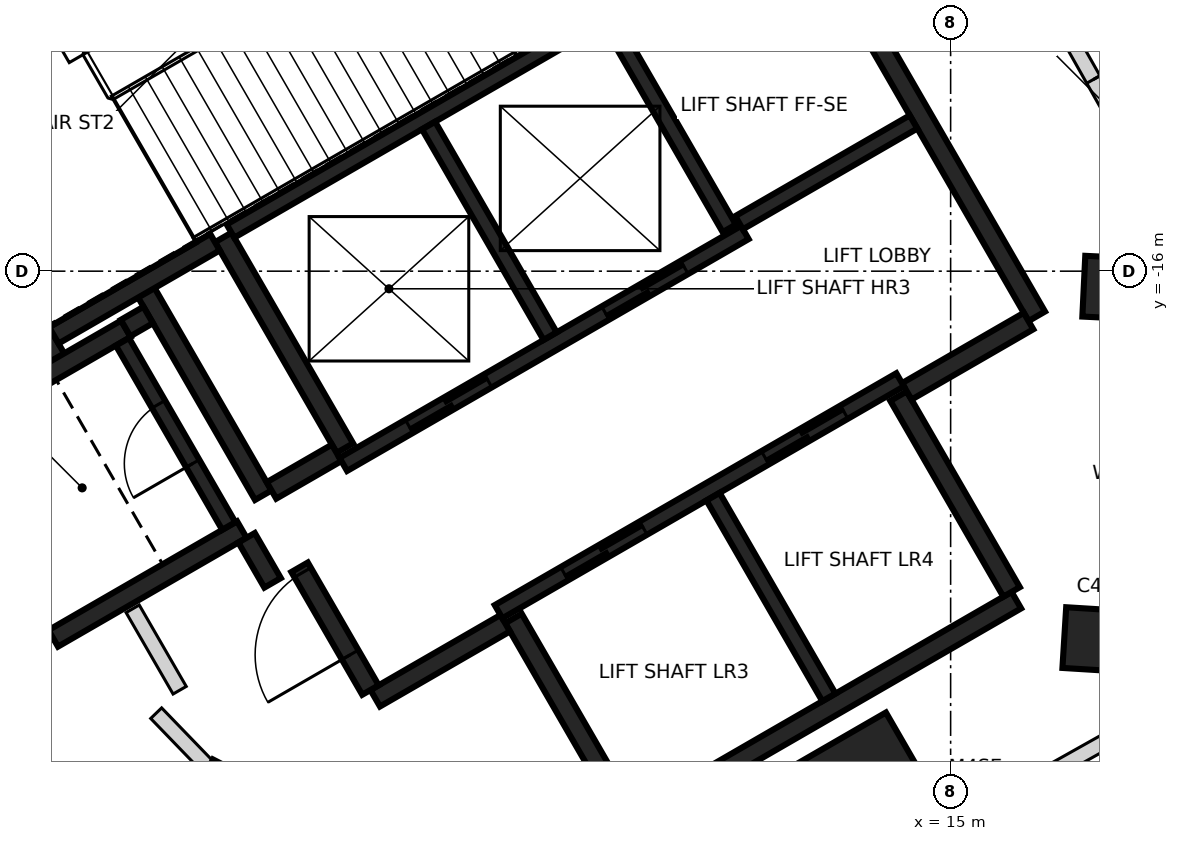
"""IFC4 building model, lengths in metres.
Left out: names, types, materials, properties, quantities, classifications, styles, units other than length and angle.
Written with IfcOpenShell. Run it as: python <this file> out.ifc"""

import sys

from ifc_helpers import new_model, si_unit, direction, frame, frame_2d, origin, origin_2d, place, context, subcontext, project, spatial, rectangle, extrude, element, fill, save


model = new_model("IFC4")
c1 = context("Model", 3, precision=1e-05, world=origin(), true_north=direction((0.0, 1.0)))
c2 = subcontext(c1, "Body", "Model", "MODEL_VIEW")
j1 = project(units=[si_unit("LENGTHUNIT", "METRE"), si_unit("PLANEANGLEUNIT", "RADIAN")], contexts=[c1])
p1 = place(None, origin())
s1 = spatial("IfcSite", under=j1, at=p1, CompositionType="ELEMENT")
p2 = place(p1, origin())
s2 = spatial("IfcBuilding", under=s1, at=p2, CompositionType="ELEMENT")
p3 = place(p2, frame((0.0, 0.0, 169.6)))
s3 = spatial("IfcBuildingStorey", under=s2, at=p3, CompositionType="ELEMENT", Elevation=169.6)
for number, where, z_axis, x_axis in (
    (1, (17.07, -20.856, -0.35), (0.0, 0.0, 1.0), (-0.998, 0.062, 0.0)),
    (2, (17.326, -16.226, -0.35), (0.0, 0.0, 1.0), (-0.999, 0.048, 0.0)),
    (3, (5.388, -23.118, -0.35), (0.0, 0.0, 1.0), (0.458, 0.889, 0.0)),
):
    element("IfcColumn", number, at=place(p3, frame(where, z_axis=z_axis, x_axis=x_axis)), inside=s3, PredefinedType="COLUMN", context=c2, shape_type="SweptSolid", body=[
        extrude(rectangle(XDim=1.15, YDim=0.8, at=origin_2d()), origin(), (0.0, 0.0, 1.0), 6.0),
    ])
p4 = place(p3, frame((13.78, -23.867, -0.35), z_axis=(0.0, 0.0, 1.0), x_axis=(-0.5, 0.866025403784, 0.0)))
e4 = element("IfcColumn", 4, at=p4, inside=s3, PredefinedType="COLUMN", context=c2, shape_type="SweptSolid", body=[
    extrude(rectangle(XDim=3.2, YDim=2.7, at=origin_2d()), origin(), (0.0, 0.0, 1.0), 6.0),
])
p5 = place(p3, frame((13.008, -11.181, 0.0), z_axis=(0.0, 0.0, 1.0), x_axis=(0.500004234368, -0.866022959057, 0.0)))
e5 = element("IfcWall", 5, at=p5, inside=s3, PredefinedType="SHEAR", context=c2, shape_type="SweptSolid", body=[
    extrude(rectangle(XDim=6.25, YDim=0.25, at=frame_2d((3.125, 0.0))), origin(), (0.0, 0.0, 1.0), 5.65),
])
p6 = place(p3, frame((15.865, -20.328, 0.0), z_axis=(0.0, 0.0, 1.0), x_axis=(-0.86602852612, -0.499994591916, 0.0)))
e6 = element("IfcWall", 6, at=p6, inside=s3, PredefinedType="SHEAR", context=c2, shape_type="SweptSolid", body=[
    extrude(rectangle(XDim=5.85, YDim=0.25, at=frame_2d((2.925, 0.0))), origin(), (0.0, 0.0, 1.0), 5.65),
])
p7 = place(p3, frame((3.235, -17.153, 0.0), z_axis=(0.0, 0.0, 1.0), x_axis=(-0.500008851346, 0.866020293397, 0.0)))
e7 = element("IfcWall", 7, at=p7, inside=s3, PredefinedType="SHEAR", context=c2, shape_type="SweptSolid", body=[
    extrude(rectangle(XDim=5.51, YDim=0.25, at=frame_2d((2.755, 0.0))), origin(), (0.0, 0.0, 1.0), 5.65),
])
p8 = place(p3, frame((7.031, -18.327, 0.0), z_axis=(0.0, 0.0, 1.0), x_axis=(-0.499971222258, 0.866042017984, 0.0)))
e8 = element("IfcWall", 8, at=p8, inside=s3, PredefinedType="SHEAR", context=c2, shape_type="SweptSolid", body=[
    extrude(rectangle(XDim=3.2, YDim=0.25, at=frame_2d((1.6, 0.0))), origin(), (0.0, 0.0, 1.0), 5.65),
])
for number, where, z_axis, x_axis in (
    (9, (14.315, -17.644, 0.0), (0.0, 0.0, 1.0), (0.5, -0.866, 0.0)),
    (10, (10.736, -23.145, 0.0), (0.0, 0.0, 1.0), (-0.5, 0.866, 0.0)),
):
    element("IfcWall", number, at=place(p3, frame(where, z_axis=z_axis, x_axis=x_axis)), inside=s3, PredefinedType="SHEAR", context=c2, shape_type="SweptSolid", body=[
        extrude(rectangle(XDim=2.974, YDim=0.25, at=frame_2d((1.487, 0.0))), origin(), (0.0, 0.0, 1.0), 5.65),
    ])
p9 = place(p3, frame((3.085, -20.894, 0.0), z_axis=(0.0, 0.0, 1.0), x_axis=(-0.499978833458, 0.866037623948, 0.0)))
e11 = element("IfcWall", 11, at=p9, inside=s3, PredefinedType="SHEAR", context=c2, shape_type="SweptSolid", body=[
    extrude(rectangle(XDim=3.05, YDim=0.25, at=frame_2d((1.525, 0.0))), origin(), (0.0, 0.0, 1.0), 5.65),
])
p10 = place(p3, frame((1.669, -18.19, 0.0), z_axis=(0.0, 0.0, 1.0), x_axis=(0.866042235819, 0.499970844928, 0.0)))
e12 = element("IfcWall", 12, at=p10, inside=s3, PredefinedType="SHEAR", context=c2, shape_type="SweptSolid", body=[
    extrude(rectangle(XDim=2.865, YDim=0.25, at=frame_2d((1.432, 0.0))), origin(), (0.0, 0.0, 1.0), 5.65),
])
p11 = place(p3, frame((5.675, -19.399, 0.0), z_axis=(0.0, 0.0, 1.0), x_axis=(-0.866026637627, -0.499997862916, 0.0)))
e13 = element("IfcWall", 13, at=p11, inside=s3, PredefinedType="SHEAR", context=c2, shape_type="SweptSolid", body=[
    extrude(rectangle(XDim=2.865, YDim=0.25, at=frame_2d((1.432, 0.0))), origin(), (0.0, 0.0, 1.0), 5.65),
])
p12 = place(p3, frame((4.414, -16.276, 0.0), z_axis=(0.0, 0.0, 1.0), x_axis=(0.500003324108, -0.866023484601, 0.0)))
e14 = element("IfcWall", 14, at=p12, inside=s3, PredefinedType="SHEAR", context=c2, shape_type="SweptSolid", body=[
    extrude(rectangle(XDim=3.085, YDim=0.25, at=frame_2d((1.542, 0.0))), origin(), (0.0, 0.0, 1.0), 5.65),
])
p13 = place(p3, frame((5.322, -15.619, 0.0), z_axis=(0.0, 0.0, 1.0), x_axis=(-0.866026229868, -0.499998569178, 0.0)))
e15 = element("IfcWall", 15, at=p13, inside=s3, PredefinedType="SHEAR", context=c2, shape_type="SweptSolid", body=[
    extrude(rectangle(XDim=2.449, YDim=0.25, at=frame_2d((1.225, 0.0))), origin(), (0.0, 0.0, 1.0), 5.65),
])
p14 = place(p3, frame((9.14, -20.631, 0.0), z_axis=(0.0, 0.0, 1.0), x_axis=(-0.866043531843, -0.499968599967, 0.0)))
e16 = element("IfcWall", 16, at=p14, inside=s3, PredefinedType="SHEAR", context=c2, shape_type="SweptSolid", body=[
    extrude(rectangle(XDim=1.975, YDim=0.25, at=frame_2d((0.987, 0.0))), origin(), (0.0, 0.0, 1.0), 5.65),
])
p15 = place(p3, frame((16.025, -16.656, 0.0), z_axis=(0.0, 0.0, 1.0), x_axis=(-0.866016279763, -0.500015802937, 0.0)))
e17 = element("IfcWall", 17, at=p15, inside=s3, PredefinedType="SHEAR", context=c2, shape_type="SweptSolid", body=[
    extrude(rectangle(XDim=1.849, YDim=0.25, at=frame_2d((0.925, 0.0))), origin(), (0.0, 0.0, 1.0), 5.65),
])
p16 = place(p3, frame((7.367, -21.51, 0.0), z_axis=(0.0, 0.0, 1.0), x_axis=(-0.499983108224, 0.866035156036, 0.0)))
e18 = element("IfcWall", 18, at=p16, inside=s3, PredefinedType="SHEAR", context=c2, shape_type="SweptSolid", body=[
    extrude(rectangle(XDim=1.865, YDim=0.25, at=frame_2d((0.932, 0.0))), origin(), (0.0, 0.0, 1.0), 5.65),
])
p17 = place(p16, frame((0.535, 0.0, 0.0)))
e19 = element("IfcOpeningElement", 19, at=p17, cuts=e18, PredefinedType="OPENING", context=c2, shape_type="SweptSolid", body=[
    extrude(rectangle(XDim=1.25, YDim=2.1, at=frame_2d((0.625, 1.05))), frame((0.0, 0.135, 0.0), z_axis=(0.0, -1.0, 0.0), x_axis=(1.0, 0.0, 0.0)), (0.0, 0.0, 1.0), 0.27),
])
p18 = place(p3, frame((6.065, -18.885, 0.0), z_axis=(0.0, 0.0, 1.0), x_axis=(0.866017078145, 0.500014420154, 0.0)))
e20 = element("IfcWall", 20, at=p18, inside=s3, PredefinedType="SHEAR", context=c2, shape_type="SweptSolid", body=[
    extrude(rectangle(XDim=0.989, YDim=0.25, at=frame_2d((0.495, 0.0))), origin(), (0.0, 0.0, 1.0), 5.65),
])
p19 = place(p3, frame((6.08, -20.1, 0.0), z_axis=(0.0, 0.0, 1.0), x_axis=(-0.500051773299, 0.865995510393, 0.0)))
e21 = element("IfcWall", 21, at=p19, inside=s3, PredefinedType="SHEAR", context=c2, shape_type="SweptSolid", body=[
    extrude(rectangle(XDim=0.685, YDim=0.25, at=frame_2d((0.342, 0.0))), origin(), (0.0, 0.0, 1.0), 5.65),
])
p20 = place(p3, frame((4.145, -16.749, 0.0), z_axis=(0.0, 0.0, 1.0), x_axis=(0.866185586049, 0.49972245349, 0.0)))
e22 = element("IfcWall", 22, at=p20, inside=s3, PredefinedType="SHEAR", context=c2, shape_type="SweptSolid", body=[
    extrude(rectangle(XDim=0.344, YDim=0.25, at=frame_2d((0.172, 0.0))), origin(), (0.0, 0.0, 1.0), 5.65),
])
p21 = place(p3, frame((9.052, -20.48, 0.0), z_axis=(0.0, 0.0, 1.0), x_axis=(0.866030299012, 0.499991521122, 0.0)))
e23 = element("IfcWall", 23, at=p21, inside=s3, PredefinedType="SHEAR", context=c2, shape_type="SweptSolid", body=[
    extrude(rectangle(XDim=6.1, YDim=0.2, at=frame_2d((3.05, 0.0))), origin(), (0.0, 0.0, 1.0), 5.65),
])
p22 = place(p21, frame((1.0, 0.0, 0.0)))
e24 = element("IfcOpeningElement", 24, at=p22, cuts=e23, PredefinedType="OPENING", context=c2, shape_type="SweptSolid", body=[
    extrude(rectangle(XDim=1.2, YDim=2.1, at=frame_2d((0.6, 1.05))), frame((0.0, 0.11, 0.0), z_axis=(0.0, -1.0, 0.0), x_axis=(1.0, 0.0, 0.0)), (0.0, 0.0, 1.0), 0.22),
])
p23 = place(p21, frame((4.05, 0.0, 0.0)))
e25 = element("IfcOpeningElement", 25, at=p23, cuts=e23, PredefinedType="OPENING", context=c2, shape_type="SweptSolid", body=[
    extrude(rectangle(XDim=1.2, YDim=2.1, at=frame_2d((0.6, 1.05))), frame((0.0, 0.11, 0.0), z_axis=(0.0, -1.0, 0.0), x_axis=(1.0, 0.0, 0.0)), (0.0, 0.0, 1.0), 0.22),
])
p24 = place(p3, frame((5.526, -15.472, 0.0), z_axis=(0.0, 0.0, 1.0), x_axis=(0.866041752167, 0.499971682701, 0.0)))
e26 = element("IfcWall", 26, at=p24, inside=s3, PredefinedType="SHEAR", context=c2, shape_type="SweptSolid", body=[
    extrude(rectangle(XDim=5.851, YDim=0.2, at=frame_2d((2.925, 0.0))), origin(), (0.0, 0.0, 1.0), 5.65),
])
p25 = place(p3, frame((12.293, -15.491, 0.0), z_axis=(0.0, 0.0, 1.0), x_axis=(-0.866030299012, -0.499991521122, 0.0)))
e27 = element("IfcWall", 27, at=p25, inside=s3, PredefinedType="SHEAR", context=c2, shape_type="SweptSolid", body=[
    extrude(rectangle(XDim=6.1, YDim=0.2, at=frame_2d((3.05, 0.0))), origin(), (0.0, 0.0, 1.0), 5.65),
])
p26 = place(p25, frame((3.9, 0.0, 0.0)))
e28 = element("IfcOpeningElement", 28, at=p26, cuts=e27, PredefinedType="OPENING", context=c2, shape_type="SweptSolid", body=[
    extrude(rectangle(XDim=1.2, YDim=2.1, at=frame_2d((0.6, 1.05))), frame((0.0, 0.11, 0.0), z_axis=(0.0, -1.0, 0.0), x_axis=(1.0, 0.0, 0.0)), (0.0, 0.0, 1.0), 0.22),
])
p27 = place(p25, frame((0.918, 0.0, 0.0)))
e29 = element("IfcOpeningElement", 29, at=p27, cuts=e27, PredefinedType="OPENING", context=c2, shape_type="SweptSolid", body=[
    extrude(rectangle(XDim=1.2, YDim=2.1, at=frame_2d((0.6, 1.05))), frame((0.0, 0.11, 0.0), z_axis=(0.0, -1.0, 0.0), x_axis=(1.0, 0.0, 0.0)), (0.0, 0.0, 1.0), 0.22),
])
p28 = place(p3, frame((8.132, -14.084, 0.0), z_axis=(0.0, 0.0, 1.0), x_axis=(0.499997778408, -0.866026686418, 0.0)))
e30 = element("IfcWall", 30, at=p28, inside=s3, PredefinedType="SHEAR", context=c2, shape_type="SweptSolid", body=[
    extrude(rectangle(XDim=3.198, YDim=0.2, at=frame_2d((1.599, 0.0))), origin(), (0.0, 0.0, 1.0), 5.65),
])
p29 = place(p3, frame((11.875, -18.967, 0.0), z_axis=(0.0, 0.0, 1.0), x_axis=(0.49998131003, -0.866036194175, 0.0)))
e31 = element("IfcWall", 31, at=p29, inside=s3, PredefinedType="SHEAR", context=c2, shape_type="SweptSolid", body=[
    extrude(rectangle(XDim=3.048, YDim=0.2, at=frame_2d((1.524, 0.0))), origin(), (0.0, 0.0, 1.0), 5.65),
])
p30 = place(p3, frame((5.503, -19.352, 0.0), z_axis=(0.0, 0.0, 1.0), x_axis=(-0.499986818241, 0.866033014143, 0.0)))
e32 = element("IfcWall", 32, at=p30, inside=s3, PredefinedType="SHEAR", context=c2, shape_type="SweptSolid", body=[
    extrude(rectangle(XDim=2.798, YDim=0.2, at=frame_2d((1.399, 0.0))), origin(), (0.0, 0.0, 1.0), 5.65),
])
p31 = place(p30, frame((0.949, 0.0, 0.0)))
e33 = element("IfcOpeningElement", 33, at=p31, cuts=e32, PredefinedType="OPENING", context=c2, shape_type="SweptSolid", body=[
    extrude(rectangle(XDim=0.9, YDim=2.1, at=frame_2d((0.45, 1.05))), frame((0.0, 0.11, 0.0), z_axis=(0.0, -1.0, 0.0), x_axis=(1.0, 0.0, 0.0)), (0.0, 0.0, 1.0), 0.22),
])
p32 = place(p3, frame((12.088, -15.437, 0.0), z_axis=(0.0, 0.0, 1.0), x_axis=(-0.500026960575, 0.86600983753, 0.0)))
e34 = element("IfcWall", 34, at=p32, inside=s3, PredefinedType="SHEAR", context=c2, shape_type="SweptSolid", body=[
    extrude(rectangle(XDim=3.1, YDim=0.2, at=frame_2d((1.55, 0.0))), origin(), (0.0, 0.0, 1.0), 5.65),
])
p33 = place(p3, frame((14.512, -14.037, 0.0), z_axis=(0.0, 0.0, 1.0), x_axis=(-0.866018407898, -0.500012117035, 0.0)))
e35 = element("IfcWall", 35, at=p33, inside=s3, PredefinedType="SHEAR", context=c2, shape_type="SweptSolid", body=[
    extrude(rectangle(XDim=2.651, YDim=0.2, at=frame_2d((1.325, 0.0))), origin(), (0.0, 0.0, 1.0), 5.65),
])
p34 = place(p3, frame((4.239, -20.442, 0.0), z_axis=(0.0, 0.0, 1.0), x_axis=(0.499790804427, -0.866146149221, 0.0)))
e36 = element("IfcWall", 36, at=p34, inside=s3, PredefinedType="PARTITIONING", context=c2, shape_type="SweptSolid", body=[
    extrude(rectangle(XDim=1.237, YDim=0.2, at=frame_2d((0.618, 0.0))), origin(), (0.0, 0.0, 1.0), 5.65),
])
p35 = place(p3, frame((4.548, -21.815, 0.0), z_axis=(0.0, 0.0, 1.0), x_axis=(0.694726619633, -0.71927388662, 0.0)))
e37 = element("IfcWall", 37, at=p35, inside=s3, PredefinedType="PARTITIONING", context=c2, shape_type="SweptSolid", body=[
    extrude(rectangle(XDim=1.88, YDim=0.2, at=frame_2d((0.94, 0.0))), origin(), (0.0, 0.0, 1.0), 5.65),
])
p36 = place(p3, frame((10.974, -25.59, 0.0), z_axis=(0.0, 0.0, 1.0), x_axis=(0.872017342382, 0.489474978508, 0.0)))
e38 = element("IfcWall", 38, at=p36, inside=s3, PredefinedType="PARTITIONING", context=c2, shape_type="SweptSolid", body=[
    extrude(rectangle(XDim=7.137, YDim=0.2, at=frame_2d((3.568, 0.0))), origin(), (0.0, 0.0, 1.0), 4.75),
])
p37 = place(p3, frame((12.187, -5.164, 0.0), z_axis=(0.0, 0.0, 1.0), x_axis=(0.491323462206, -0.870977184251, 0.0)))
e39 = element("IfcWall", 39, at=p37, inside=s3, PredefinedType="PARTITIONING", context=c2, shape_type="SweptSolid", body=[
    extrude(rectangle(XDim=12.523, YDim=0.2, at=frame_2d((6.261, 0.0))), origin(), (0.0, 0.0, 1.0), 4.75),
])
p38 = place(p37, frame((9.546, 0.0, 0.0)))
e40 = element("IfcOpeningElement", 40, at=p38, cuts=e39, PredefinedType="OPENING", context=c2, shape_type="SweptSolid", body=[
    extrude(rectangle(XDim=0.9, YDim=2.1, at=frame_2d((0.45, 1.05))), frame((0.0, 0.11, 0.0), z_axis=(0.0, -1.0, 0.0), x_axis=(1.0, 0.0, 0.0)), (0.0, 0.0, 1.0), 0.22),
])
p39 = place(p37, frame((2.168, 0.0, 0.0)))
e41 = element("IfcOpeningElement", 41, at=p39, cuts=e39, PredefinedType="OPENING", context=c2, shape_type="SweptSolid", body=[
    extrude(rectangle(XDim=1.0, YDim=2.1, at=frame_2d((0.5, 1.05))), frame((0.0, 0.11, 0.0), z_axis=(0.0, -1.0, 0.0), x_axis=(1.0, 0.0, 0.0)), (0.0, 0.0, 1.0), 0.22),
])
p40 = place(p26, origin())
e42 = element("IfcDoor", 42, at=p40, inside=s3, OperationType="DOUBLE_DOOR_SLIDING", PredefinedType="DOOR", context=c2, shape_type="SweptSolid", body=[
    extrude(rectangle(XDim=1.2, YDim=2.1, at=frame_2d((0.6, 1.05))), frame((0.0, 0.025, 0.0), z_axis=(0.0, -1.0, 0.0), x_axis=(1.0, 0.0, 0.0)), (0.0, 0.0, 1.0), 0.05),
])
fill(e28, e42)
p41 = place(p27, origin())
e43 = element("IfcDoor", 43, at=p41, inside=s3, OperationType="DOUBLE_DOOR_SLIDING", PredefinedType="DOOR", context=c2, shape_type="SweptSolid", body=[
    extrude(rectangle(XDim=1.2, YDim=2.1, at=frame_2d((0.6, 1.05))), frame((0.0, 0.025, 0.0), z_axis=(0.0, -1.0, 0.0), x_axis=(1.0, 0.0, 0.0)), (0.0, 0.0, 1.0), 0.05),
])
fill(e29, e43)
p42 = place(p22, origin())
e44 = element("IfcDoor", 44, at=p42, inside=s3, OperationType="DOUBLE_DOOR_SLIDING", PredefinedType="DOOR", context=c2, shape_type="SweptSolid", body=[
    extrude(rectangle(XDim=1.2, YDim=2.1, at=frame_2d((0.6, 1.05))), frame((0.0, 0.025, 0.0), z_axis=(0.0, -1.0, 0.0), x_axis=(1.0, 0.0, 0.0)), (0.0, 0.0, 1.0), 0.05),
])
fill(e24, e44)
p43 = place(p23, origin())
e45 = element("IfcDoor", 45, at=p43, inside=s3, OperationType="DOUBLE_DOOR_SLIDING", PredefinedType="DOOR", context=c2, shape_type="SweptSolid", body=[
    extrude(rectangle(XDim=1.2, YDim=2.1, at=frame_2d((0.6, 1.05))), frame((0.0, 0.025, 0.0), z_axis=(0.0, -1.0, 0.0), x_axis=(1.0, 0.0, 0.0)), (0.0, 0.0, 1.0), 0.05),
])
fill(e25, e45)
p44 = place(p17, origin())
e46 = element("IfcDoor", 46, at=p44, inside=s3, OperationType="SINGLE_SWING_LEFT", PredefinedType="DOOR", context=c2, shape_type="SweptSolid", body=[
    extrude(rectangle(XDim=1.25, YDim=2.1, at=frame_2d((0.625, 1.05))), frame((0.0, 0.025, 0.0), z_axis=(0.0, -1.0, 0.0), x_axis=(1.0, 0.0, 0.0)), (0.0, 0.0, 1.0), 0.05),
])
fill(e19, e46)
p45 = place(p31, origin())
e47 = element("IfcDoor", 47, at=p45, inside=s3, OperationType="SINGLE_SWING_LEFT", PredefinedType="DOOR", context=c2, shape_type="SweptSolid", body=[
    extrude(rectangle(XDim=0.9, YDim=2.1, at=frame_2d((0.45, 1.05))), frame((0.0, 0.025, 0.0), z_axis=(0.0, -1.0, 0.0), x_axis=(1.0, 0.0, 0.0)), (0.0, 0.0, 1.0), 0.05),
])
fill(e33, e47)
p46 = place(p38, frame((0.9, 0.0, 0.0), z_axis=(0.0, 0.0, 1.0), x_axis=(-1.0, 0.0, 0.0)))
e48 = element("IfcDoor", 48, at=p46, inside=s3, OperationType="SINGLE_SWING_LEFT", PredefinedType="DOOR", context=c2, shape_type="SweptSolid", body=[
    extrude(rectangle(XDim=0.9, YDim=2.1, at=frame_2d((0.45, 1.05))), frame((0.0, 0.025, 0.0), z_axis=(0.0, -1.0, 0.0), x_axis=(1.0, 0.0, 0.0)), (0.0, 0.0, 1.0), 0.05),
])
fill(e40, e48)
save(model, sys.argv[1])
